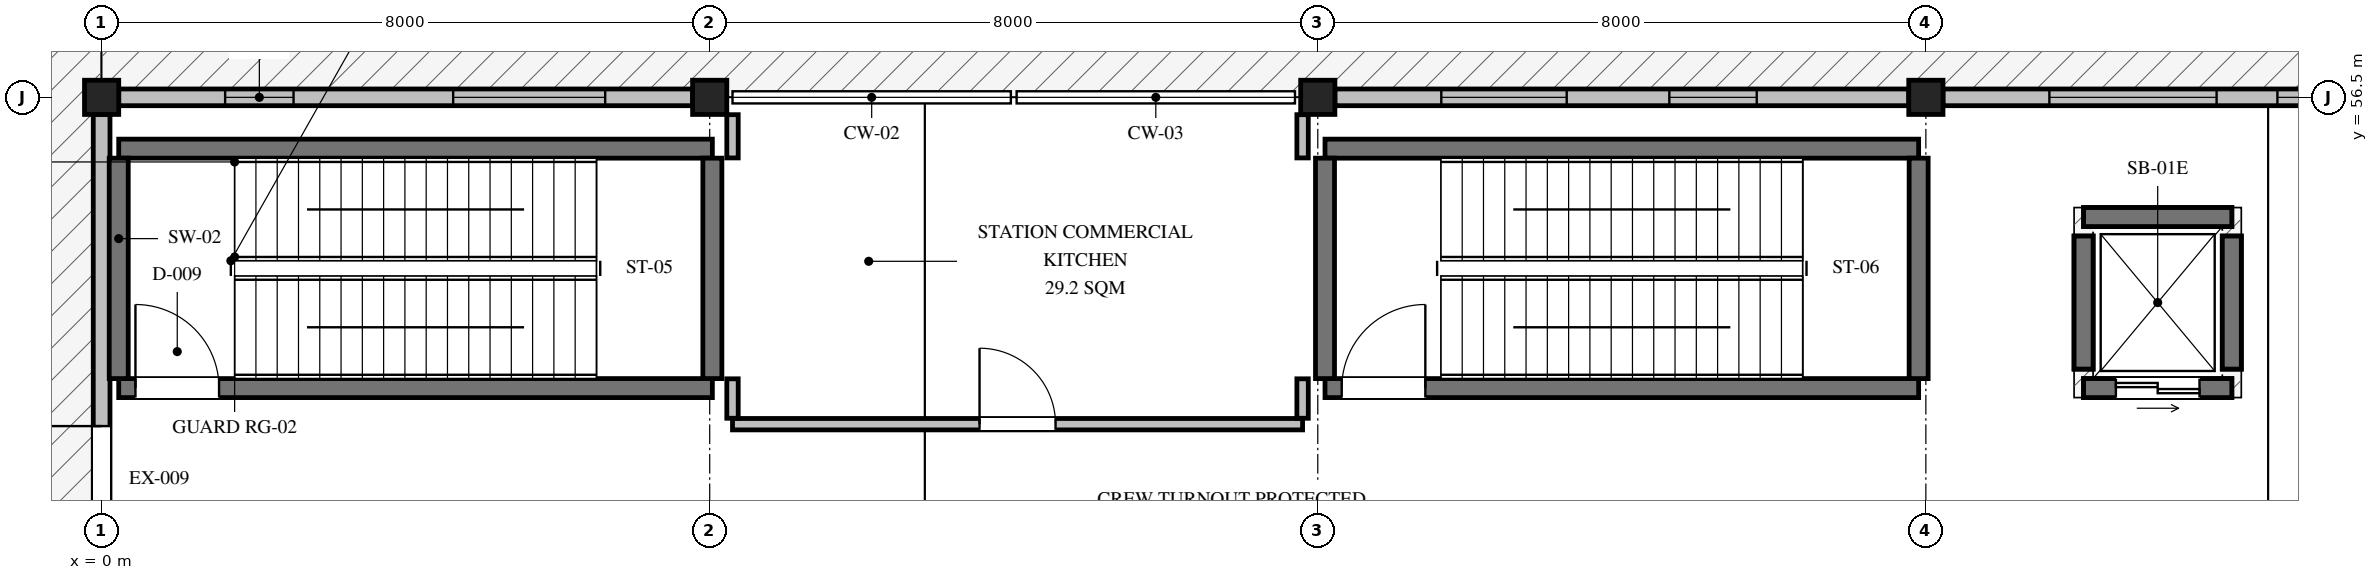
"""IFC4 building model, lengths in metres.
Left out: names, types, materials, properties, quantities, classifications, styles, units other than length and angle.
Written with IfcOpenShell. Run it as: python <this file> out.ifc"""

import sys

from ifc_helpers import new_model, si_unit, direction, frame, frame_2d, origin, origin_2d, place, context, subcontext, project, spatial, rectangle, hollow_rectangle, extrude, element, fill, save


model = new_model("IFC4")
c1 = context("Model", 3, precision=1e-05, world=origin(), true_north=direction((0.0, 1.0)))
c2 = subcontext(c1, "Body", "Model", "MODEL_VIEW")
j1 = project(units=[si_unit("LENGTHUNIT", "METRE"), si_unit("PLANEANGLEUNIT", "RADIAN")], contexts=[c1])
p1 = place(None, origin())
s1 = spatial("IfcSite", under=j1, at=p1, CompositionType="ELEMENT")
p2 = place(p1, origin())
s2 = spatial("IfcBuilding", under=s1, at=p2, CompositionType="ELEMENT")
p3 = place(p2, frame((0.0, 0.0, 0.45)))
s3 = spatial("IfcBuildingStorey", under=s2, at=p3, CompositionType="ELEMENT", Elevation=0.45)
for number, where, z_axis, x_axis in (
    (1, (0.0, 56.5, -0.45), (0.0, 0.0, 1.0), (1.0, 0.0, 0.0)),
    (2, (8.0, 56.5, -0.45), (0.0, 0.0, 1.0), (1.0, 0.0, 0.0)),
    (3, (16.0, 56.5, -0.45), (0.0, 0.0, 1.0), (1.0, 0.0, 0.0)),
    (4, (24.0, 56.5, -0.45), (0.0, 0.0, 1.0), (1.0, 0.0, 0.0)),
):
    element("IfcColumn", number, at=place(p3, frame(where, z_axis=z_axis, x_axis=x_axis)), inside=s3, PredefinedType="COLUMN", context=c2, shape_type="SweptSolid", body=[
        extrude(hollow_rectangle(XDim=0.45, YDim=0.45, WallThickness=0.022, at=origin_2d()), origin(), (0.0, 0.0, 1.0), 5.85),
    ])
p4 = place(p3, frame((0.0, 42.725, 0.0), z_axis=(0.0, 0.0, 1.0), x_axis=(0.0, 1.0, 0.0)))
e5 = element("IfcWall", 5, at=p4, inside=s3, PredefinedType="SOLIDWALL", context=c2, shape_type="SweptSolid", body=[
    extrude(rectangle(XDim=13.55, YDim=0.22, at=frame_2d((6.775, 0.0))), origin(), (0.0, 0.0, 1.0), 4.544),
])
p5 = place(p4, frame((8.05, 0.0, 0.0)))
e6 = element("IfcOpeningElement", 6, at=p5, cuts=e5, PredefinedType="OPENING", context=c2, shape_type="SweptSolid", body=[
    extrude(rectangle(XDim=1.4, YDim=2.35, at=frame_2d((0.7, 1.175))), frame((0.0, 0.12, 0.0), z_axis=(0.0, -1.0, 0.0), x_axis=(1.0, 0.0, 0.0)), (0.0, 0.0, 1.0), 0.24),
])
p6 = place(p4, frame((2.5, 0.0, 1.0)))
e7 = element("IfcOpeningElement", 7, at=p6, cuts=e5, PredefinedType="OPENING", context=c2, shape_type="SweptSolid", body=[
    extrude(rectangle(XDim=1.4, YDim=1.8, at=frame_2d((0.7, 0.9))), frame((0.0, 0.12, 0.0), z_axis=(0.0, -1.0, 0.0), x_axis=(1.0, 0.0, 0.0)), (0.0, 0.0, 1.0), 0.24),
])
p7 = place(p3, frame((0.225, 56.5, 0.0), z_axis=(0.0, 0.0, 1.0), x_axis=(1.0, 0.0, 0.0)))
e8 = element("IfcWall", 8, at=p7, inside=s3, PredefinedType="SOLIDWALL", context=c2, shape_type="SweptSolid", body=[
    extrude(rectangle(XDim=7.55, YDim=0.22, at=frame_2d((3.775, 0.0))), origin(), (0.0, 0.0, 1.0), 4.494),
])
p8 = place(p7, frame((1.4, 0.0, 0.95)))
e9 = element("IfcOpeningElement", 9, at=p8, cuts=e8, PredefinedType="OPENING", context=c2, shape_type="SweptSolid", body=[
    extrude(rectangle(XDim=0.9, YDim=1.4, at=frame_2d((0.45, 0.7))), frame((0.0, 0.12, 0.0), z_axis=(0.0, -1.0, 0.0), x_axis=(1.0, 0.0, 0.0)), (0.0, 0.0, 1.0), 0.24),
])
p9 = place(p7, frame((4.4, 0.0, 0.95)))
e10 = element("IfcOpeningElement", 10, at=p9, cuts=e8, PredefinedType="OPENING", context=c2, shape_type="SweptSolid", body=[
    extrude(rectangle(XDim=2.0, YDim=1.8, at=frame_2d((1.0, 0.9))), frame((0.0, 0.12, 0.0), z_axis=(0.0, -1.0, 0.0), x_axis=(1.0, 0.0, 0.0)), (0.0, 0.0, 1.0), 0.24),
])
p10 = place(p3, frame((16.225, 56.5, 0.0), z_axis=(0.0, 0.0, 1.0), x_axis=(1.0, 0.0, 0.0)))
e11 = element("IfcWall", 11, at=p10, inside=s3, PredefinedType="SOLIDWALL", context=c2, shape_type="SweptSolid", body=[
    extrude(rectangle(XDim=7.55, YDim=0.22, at=frame_2d((3.775, 0.0))), origin(), (0.0, 0.0, 1.0), 4.394),
])
p11 = place(p10, frame((1.4, 0.0, 0.95)))
e12 = element("IfcOpeningElement", 12, at=p11, cuts=e11, PredefinedType="OPENING", context=c2, shape_type="SweptSolid", body=[
    extrude(rectangle(XDim=1.65, YDim=1.5, at=frame_2d((0.825, 0.75))), frame((0.0, 0.12, 0.0), z_axis=(0.0, -1.0, 0.0), x_axis=(1.0, 0.0, 0.0)), (0.0, 0.0, 1.0), 0.24),
])
p12 = place(p10, frame((4.4, 0.0, 0.95)))
e13 = element("IfcOpeningElement", 13, at=p12, cuts=e11, PredefinedType="OPENING", context=c2, shape_type="SweptSolid", body=[
    extrude(rectangle(XDim=1.15, YDim=2.0, at=frame_2d((0.575, 1.0))), frame((0.0, 0.12, 0.0), z_axis=(0.0, -1.0, 0.0), x_axis=(1.0, 0.0, 0.0)), (0.0, 0.0, 1.0), 0.24),
])
p13 = place(p3, frame((24.225, 56.5, 0.0), z_axis=(0.0, 0.0, 1.0), x_axis=(1.0, 0.0, 0.0)))
e14 = element("IfcWall", 14, at=p13, inside=s3, PredefinedType="SOLIDWALL", context=c2, shape_type="SweptSolid", body=[
    extrude(rectangle(XDim=7.55, YDim=0.22, at=frame_2d((3.775, 0.0))), origin(), (0.0, 0.0, 1.0), 4.694),
])
p14 = place(p13, frame((1.4, 0.0, 0.95)))
e15 = element("IfcOpeningElement", 15, at=p14, cuts=e14, PredefinedType="OPENING", context=c2, shape_type="SweptSolid", body=[
    extrude(rectangle(XDim=2.2, YDim=1.5, at=frame_2d((1.1, 0.75))), frame((0.0, 0.12, 0.0), z_axis=(0.0, -1.0, 0.0), x_axis=(1.0, 0.0, 0.0)), (0.0, 0.0, 1.0), 0.24),
])
p15 = place(p13, frame((4.4, 0.0, 0.95)))
e16 = element("IfcOpeningElement", 16, at=p15, cuts=e14, PredefinedType="OPENING", context=c2, shape_type="SweptSolid", body=[
    extrude(rectangle(XDim=1.8, YDim=2.1, at=frame_2d((0.9, 1.05))), frame((0.0, 0.12, 0.0), z_axis=(0.0, -1.0, 0.0), x_axis=(1.0, 0.0, 0.0)), (0.0, 0.0, 1.0), 0.24),
])
p16 = place(p3, frame((0.225, 52.675, 0.0), z_axis=(0.0, 0.0, 1.0), x_axis=(1.0, 0.0, 0.0)))
e17 = element("IfcWall", 17, at=p16, inside=s3, PredefinedType="SHEAR", context=c2, shape_type="SweptSolid", body=[
    extrude(rectangle(XDim=7.81, YDim=0.25, at=frame_2d((3.905, 0.0))), origin(), (0.0, 0.0, 1.0), 5.2),
])
p17 = place(p16, frame((0.22, 0.0, 0.0)))
e18 = element("IfcOpeningElement", 18, at=p17, cuts=e17, PredefinedType="OPENING", context=c2, shape_type="SweptSolid", body=[
    extrude(rectangle(XDim=1.1, YDim=2.15, at=frame_2d((0.55, 1.075))), frame((0.0, 0.135, 0.0), z_axis=(0.0, -1.0, 0.0), x_axis=(1.0, 0.0, 0.0)), (0.0, 0.0, 1.0), 0.27),
])
p18 = place(p3, frame((0.225, 55.825, 0.0), z_axis=(0.0, 0.0, 1.0), x_axis=(1.0, 0.0, 0.0)))
e19 = element("IfcWall", 19, at=p18, inside=s3, PredefinedType="SHEAR", context=c2, shape_type="SweptSolid", body=[
    extrude(rectangle(XDim=7.81, YDim=0.25, at=frame_2d((3.905, 0.0))), origin(), (0.0, 0.0, 1.0), 5.2),
])
for number, where, z_axis, x_axis in (
    (20, (0.225, 52.8, 0.0), (0.0, 0.0, 1.0), (0.0, 1.0, 0.0)),
    (21, (8.035, 52.8, 0.0), (0.0, 0.0, 1.0), (0.0, 1.0, 0.0)),
):
    element("IfcWall", number, at=place(p3, frame(where, z_axis=z_axis, x_axis=x_axis)), inside=s3, PredefinedType="SHEAR", context=c2, shape_type="SweptSolid", body=[
        extrude(rectangle(XDim=2.9, YDim=0.25, at=frame_2d((1.45, 0.0))), origin(), (0.0, 0.0, 1.0), 5.2),
    ])
p19 = place(p3, frame((16.095, 52.675, 0.0), z_axis=(0.0, 0.0, 1.0), x_axis=(1.0, 0.0, 0.0)))
e22 = element("IfcWall", 22, at=p19, inside=s3, PredefinedType="SHEAR", context=c2, shape_type="SweptSolid", body=[
    extrude(rectangle(XDim=7.81, YDim=0.25, at=frame_2d((3.905, 0.0))), origin(), (0.0, 0.0, 1.0), 5.2),
])
p20 = place(p19, frame((0.22, 0.0, 0.0)))
e23 = element("IfcOpeningElement", 23, at=p20, cuts=e22, PredefinedType="OPENING", context=c2, shape_type="SweptSolid", body=[
    extrude(rectangle(XDim=1.1, YDim=2.15, at=frame_2d((0.55, 1.075))), frame((0.0, 0.135, 0.0), z_axis=(0.0, -1.0, 0.0), x_axis=(1.0, 0.0, 0.0)), (0.0, 0.0, 1.0), 0.27),
])
p21 = place(p3, frame((16.095, 55.825, 0.0), z_axis=(0.0, 0.0, 1.0), x_axis=(1.0, 0.0, 0.0)))
e24 = element("IfcWall", 24, at=p21, inside=s3, PredefinedType="SHEAR", context=c2, shape_type="SweptSolid", body=[
    extrude(rectangle(XDim=7.81, YDim=0.25, at=frame_2d((3.905, 0.0))), origin(), (0.0, 0.0, 1.0), 5.2),
])
for number, where, z_axis, x_axis in (
    (25, (16.095, 52.8, 0.0), (0.0, 0.0, 1.0), (0.0, 1.0, 0.0)),
    (26, (23.905, 52.8, 0.0), (0.0, 0.0, 1.0), (0.0, 1.0, 0.0)),
):
    element("IfcWall", number, at=place(p3, frame(where, z_axis=z_axis, x_axis=x_axis)), inside=s3, PredefinedType="SHEAR", context=c2, shape_type="SweptSolid", body=[
        extrude(rectangle(XDim=2.9, YDim=0.25, at=frame_2d((1.45, 0.0))), origin(), (0.0, 0.0, 1.0), 5.2),
    ])
for number, where, z_axis, x_axis in (
    (27, (26.075, 52.675, -1.65), (0.0, 0.0, 1.0), (1.0, 0.0, 0.0)),
    (28, (26.075, 54.925, -1.65), (0.0, 0.0, 1.0), (1.0, 0.0, 0.0)),
):
    element("IfcWall", number, at=place(p3, frame(where, z_axis=z_axis, x_axis=x_axis)), inside=s3, PredefinedType="SHEAR", context=c2, shape_type="SweptSolid", body=[
        extrude(rectangle(XDim=1.95, YDim=0.25, at=frame_2d((0.975, 0.0))), origin(), (0.0, 0.0, 1.0), 1.65),
    ])
for number, where, z_axis, x_axis in (
    (29, (26.075, 52.925, -1.65), (0.0, 0.0, 1.0), (0.0, 1.0, 0.0)),
    (30, (28.025, 52.925, -1.65), (0.0, 0.0, 1.0), (0.0, 1.0, 0.0)),
):
    element("IfcWall", number, at=place(p3, frame(where, z_axis=z_axis, x_axis=x_axis)), inside=s3, PredefinedType="SHEAR", context=c2, shape_type="SweptSolid", body=[
        extrude(rectangle(XDim=1.75, YDim=0.25, at=frame_2d((0.875, 0.0))), origin(), (0.0, 0.0, 1.0), 1.65),
    ])
p22 = place(p3, frame((26.075, 52.675, 0.0), z_axis=(0.0, 0.0, 1.0), x_axis=(1.0, 0.0, 0.0)))
e31 = element("IfcWall", 31, at=p22, inside=s3, PredefinedType="SHEAR", context=c2, shape_type="SweptSolid", body=[
    extrude(rectangle(XDim=1.95, YDim=0.25, at=frame_2d((0.975, 0.0))), origin(), (0.0, 0.0, 1.0), 5.2),
])
p23 = place(p22, frame((0.425, 0.0, 0.0)))
e32 = element("IfcOpeningElement", 32, at=p23, cuts=e31, PredefinedType="OPENING", context=c2, shape_type="SweptSolid", body=[
    extrude(rectangle(XDim=1.1, YDim=2.15, at=frame_2d((0.55, 1.075))), frame((0.0, 0.135, 0.0), z_axis=(0.0, -1.0, 0.0), x_axis=(1.0, 0.0, 0.0)), (0.0, 0.0, 1.0), 0.27),
])
p24 = place(p3, frame((26.075, 54.925, 0.0), z_axis=(0.0, 0.0, 1.0), x_axis=(1.0, 0.0, 0.0)))
e33 = element("IfcWall", 33, at=p24, inside=s3, PredefinedType="SHEAR", context=c2, shape_type="SweptSolid", body=[
    extrude(rectangle(XDim=1.95, YDim=0.25, at=frame_2d((0.975, 0.0))), origin(), (0.0, 0.0, 1.0), 5.2),
])
for number, where, z_axis, x_axis in (
    (34, (26.075, 52.925, 0.0), (0.0, 0.0, 1.0), (0.0, 1.0, 0.0)),
    (35, (28.025, 52.925, 0.0), (0.0, 0.0, 1.0), (0.0, 1.0, 0.0)),
):
    element("IfcWall", number, at=place(p3, frame(where, z_axis=z_axis, x_axis=x_axis)), inside=s3, PredefinedType="SHEAR", context=c2, shape_type="SweptSolid", body=[
        extrude(rectangle(XDim=1.75, YDim=0.25, at=frame_2d((0.875, 0.0))), origin(), (0.0, 0.0, 1.0), 5.2),
    ])
p25 = place(p3, frame((8.3, 52.2, 0.0), z_axis=(0.0, 0.0, 1.0), x_axis=(1.0, 0.0, 0.0)))
e36 = element("IfcWall", 36, at=p25, inside=s3, PredefinedType="PARTITIONING", context=c2, shape_type="SweptSolid", body=[
    extrude(rectangle(XDim=7.5, YDim=0.15, at=frame_2d((3.75, 0.0))), origin(), (0.0, 0.0, 1.0), 5.2),
])
p26 = place(p25, frame((3.25, 0.0, 0.0)))
e37 = element("IfcOpeningElement", 37, at=p26, cuts=e36, PredefinedType="OPENING", context=c2, shape_type="SweptSolid", body=[
    extrude(rectangle(XDim=1.0, YDim=2.1, at=frame_2d((0.5, 1.05))), frame((0.0, 0.085, 0.0), z_axis=(0.0, -1.0, 0.0), x_axis=(1.0, 0.0, 0.0)), (0.0, 0.0, 1.0), 0.17),
])
p27 = place(p3, frame((8.3, 52.278, 0.0), z_axis=(0.0, 0.0, 1.0), x_axis=(0.0, 1.0, 0.0)))
e38 = element("IfcWall", 38, at=p27, inside=s3, PredefinedType="PARTITIONING", context=c2, shape_type="SweptSolid", body=[
    extrude(rectangle(XDim=0.519, YDim=0.15, at=frame_2d((0.26, 0.0))), origin(), (0.0, 0.0, 1.0), 5.2),
])
p28 = place(p3, frame((8.3, 55.703, 0.0), z_axis=(0.0, 0.0, 1.0), x_axis=(0.0, 1.0, 0.0)))
e39 = element("IfcWall", 39, at=p28, inside=s3, PredefinedType="PARTITIONING", context=c2, shape_type="SweptSolid", body=[
    extrude(rectangle(XDim=0.569, YDim=0.15, at=frame_2d((0.285, 0.0))), origin(), (0.0, 0.0, 1.0), 5.2),
])
p29 = place(p3, frame((15.8, 52.278, 0.0), z_axis=(0.0, 0.0, 1.0), x_axis=(0.0, 1.0, 0.0)))
e40 = element("IfcWall", 40, at=p29, inside=s3, PredefinedType="PARTITIONING", context=c2, shape_type="SweptSolid", body=[
    extrude(rectangle(XDim=0.519, YDim=0.15, at=frame_2d((0.26, 0.0))), origin(), (0.0, 0.0, 1.0), 5.2),
])
p30 = place(p3, frame((15.8, 55.703, 0.0), z_axis=(0.0, 0.0, 1.0), x_axis=(0.0, 1.0, 0.0)))
e41 = element("IfcWall", 41, at=p30, inside=s3, PredefinedType="PARTITIONING", context=c2, shape_type="SweptSolid", body=[
    extrude(rectangle(XDim=0.569, YDim=0.15, at=frame_2d((0.285, 0.0))), origin(), (0.0, 0.0, 1.0), 5.2),
])
p31 = place(p5, origin())
e42 = element("IfcDoor", 42, at=p31, inside=s3, OperationType="SINGLE_SWING_RIGHT", PredefinedType="DOOR", context=c2, shape_type="SweptSolid", body=[
    extrude(rectangle(XDim=1.4, YDim=2.35, at=frame_2d((0.7, 1.175))), frame((0.0, 0.025, 0.0), z_axis=(0.0, -1.0, 0.0), x_axis=(1.0, 0.0, 0.0)), (0.0, 0.0, 1.0), 0.05),
])
fill(e6, e42)
p32 = place(p8, origin())
e43 = element("IfcWindow", 43, at=p32, inside=s3, PartitioningType="SINGLE_PANEL", PredefinedType="WINDOW", context=c2, shape_type="SweptSolid", body=[
    extrude(rectangle(XDim=0.9, YDim=1.4, at=frame_2d((0.45, 0.7))), frame((0.0, 0.03, 0.0), z_axis=(0.0, -1.0, 0.0), x_axis=(1.0, 0.0, 0.0)), (0.0, 0.0, 1.0), 0.06),
])
fill(e9, e43)
p33 = place(p9, origin())
e44 = element("IfcWindow", 44, at=p33, inside=s3, PartitioningType="SINGLE_PANEL", PredefinedType="WINDOW", context=c2, shape_type="SweptSolid", body=[
    extrude(rectangle(XDim=2.0, YDim=1.8, at=frame_2d((1.0, 0.9))), frame((0.0, 0.03, 0.0), z_axis=(0.0, -1.0, 0.0), x_axis=(1.0, 0.0, 0.0)), (0.0, 0.0, 1.0), 0.06),
])
fill(e10, e44)
p34 = place(p11, origin())
e45 = element("IfcWindow", 45, at=p34, inside=s3, PartitioningType="SINGLE_PANEL", PredefinedType="WINDOW", context=c2, shape_type="SweptSolid", body=[
    extrude(rectangle(XDim=1.65, YDim=1.5, at=frame_2d((0.825, 0.75))), frame((0.0, 0.03, 0.0), z_axis=(0.0, -1.0, 0.0), x_axis=(1.0, 0.0, 0.0)), (0.0, 0.0, 1.0), 0.06),
])
fill(e12, e45)
p35 = place(p12, origin())
e46 = element("IfcWindow", 46, at=p35, inside=s3, PartitioningType="SINGLE_PANEL", PredefinedType="WINDOW", context=c2, shape_type="SweptSolid", body=[
    extrude(rectangle(XDim=1.15, YDim=2.0, at=frame_2d((0.575, 1.0))), frame((0.0, 0.03, 0.0), z_axis=(0.0, -1.0, 0.0), x_axis=(1.0, 0.0, 0.0)), (0.0, 0.0, 1.0), 0.06),
])
fill(e13, e46)
p36 = place(p14, origin())
e47 = element("IfcWindow", 47, at=p36, inside=s3, PartitioningType="SINGLE_PANEL", PredefinedType="WINDOW", context=c2, shape_type="SweptSolid", body=[
    extrude(rectangle(XDim=2.2, YDim=1.5, at=frame_2d((1.1, 0.75))), frame((0.0, 0.03, 0.0), z_axis=(0.0, -1.0, 0.0), x_axis=(1.0, 0.0, 0.0)), (0.0, 0.0, 1.0), 0.06),
])
fill(e15, e47)
p37 = place(p15, origin())
e48 = element("IfcWindow", 48, at=p37, inside=s3, PartitioningType="SINGLE_PANEL", PredefinedType="WINDOW", context=c2, shape_type="SweptSolid", body=[
    extrude(rectangle(XDim=1.8, YDim=2.1, at=frame_2d((0.9, 1.05))), frame((0.0, 0.03, 0.0), z_axis=(0.0, -1.0, 0.0), x_axis=(1.0, 0.0, 0.0)), (0.0, 0.0, 1.0), 0.06),
])
fill(e16, e48)
p38 = place(p17, frame((1.1, 0.0, 0.0), z_axis=(0.0, 0.0, 1.0), x_axis=(-1.0, 0.0, 0.0)))
e49 = element("IfcDoor", 49, at=p38, inside=s3, OperationType="SINGLE_SWING_LEFT", PredefinedType="DOOR", context=c2, shape_type="SweptSolid", body=[
    extrude(rectangle(XDim=1.1, YDim=2.15, at=frame_2d((0.55, 1.075))), frame((0.0, 0.025, 0.0), z_axis=(0.0, -1.0, 0.0), x_axis=(1.0, 0.0, 0.0)), (0.0, 0.0, 1.0), 0.05),
])
fill(e18, e49)
p39 = place(p20, frame((1.1, 0.0, 0.0), z_axis=(0.0, 0.0, 1.0), x_axis=(-1.0, 0.0, 0.0)))
e50 = element("IfcDoor", 50, at=p39, inside=s3, OperationType="SINGLE_SWING_RIGHT", PredefinedType="DOOR", context=c2, shape_type="SweptSolid", body=[
    extrude(rectangle(XDim=1.1, YDim=2.15, at=frame_2d((0.55, 1.075))), frame((0.0, 0.025, 0.0), z_axis=(0.0, -1.0, 0.0), x_axis=(1.0, 0.0, 0.0)), (0.0, 0.0, 1.0), 0.05),
])
fill(e23, e50)
p40 = place(p23, origin())
e51 = element("IfcDoor", 51, at=p40, inside=s3, OperationType="DOUBLE_DOOR_SLIDING", PredefinedType="DOOR", context=c2, shape_type="SweptSolid", body=[
    extrude(rectangle(XDim=1.1, YDim=2.15, at=frame_2d((0.55, 1.075))), frame((0.0, 0.025, 0.0), z_axis=(0.0, -1.0, 0.0), x_axis=(1.0, 0.0, 0.0)), (0.0, 0.0, 1.0), 0.05),
])
fill(e32, e51)
p41 = place(p26, origin())
e52 = element("IfcDoor", 52, at=p41, inside=s3, OperationType="SINGLE_SWING_LEFT", PredefinedType="DOOR", context=c2, shape_type="SweptSolid", body=[
    extrude(rectangle(XDim=1.0, YDim=2.1, at=frame_2d((0.5, 1.05))), frame((0.0, 0.025, 0.0), z_axis=(0.0, -1.0, 0.0), x_axis=(1.0, 0.0, 0.0)), (0.0, 0.0, 1.0), 0.05),
])
fill(e37, e52)
save(model, sys.argv[1])
